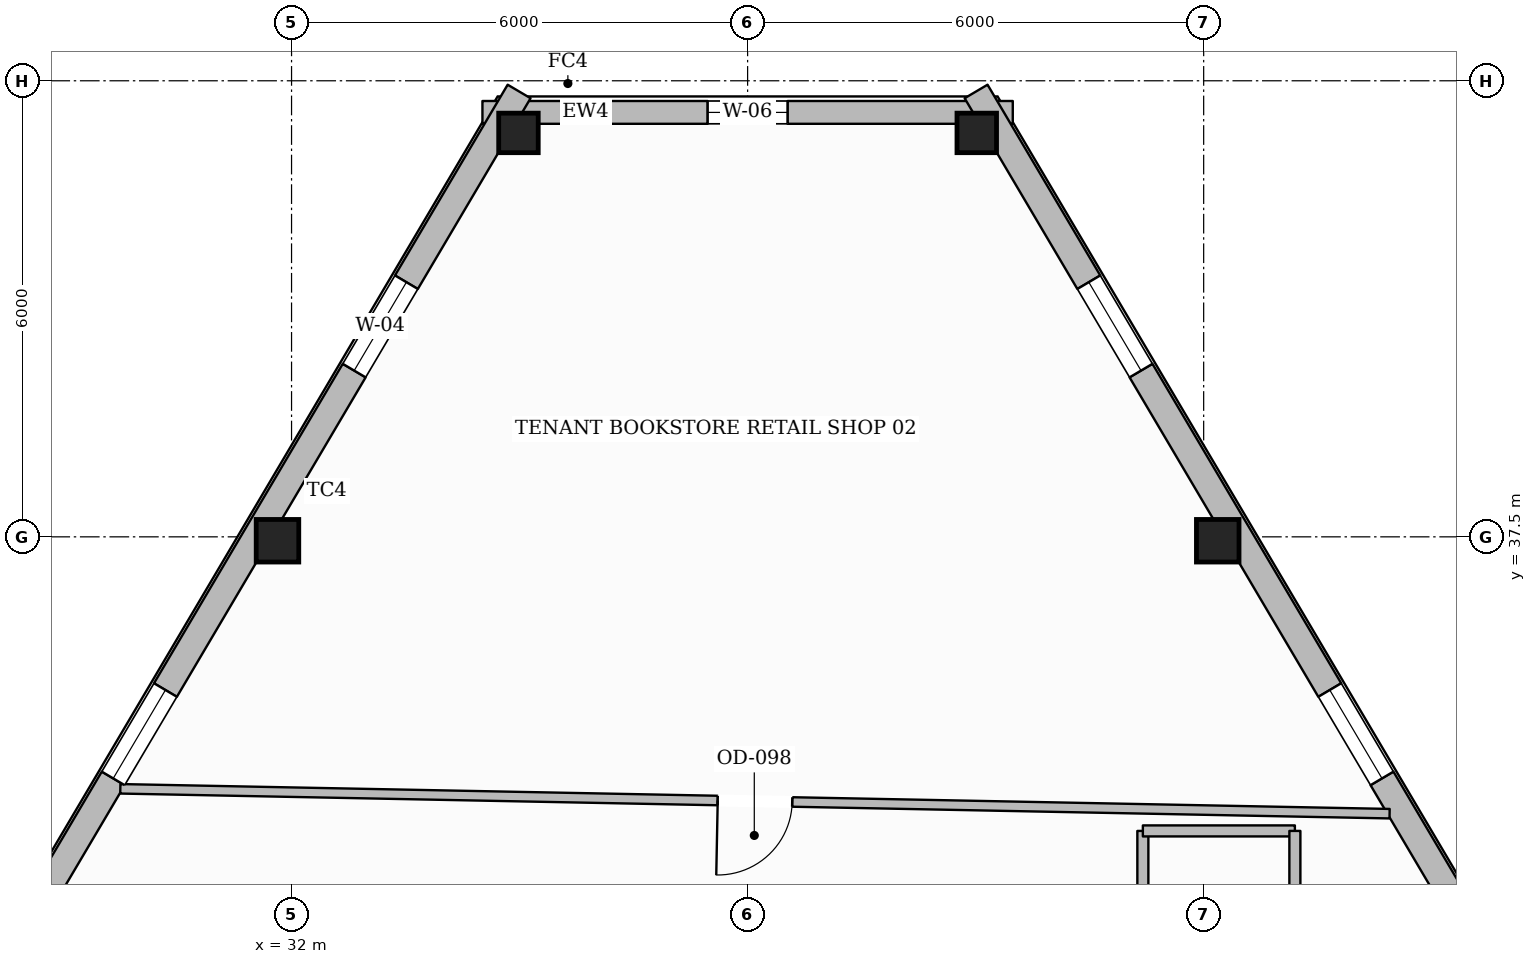
"""IFC4 building model, lengths in metres.
Left out: names, types, materials, properties, quantities, classifications, styles, units other than length and angle.
Written with IfcOpenShell. Run it as: python <this file> out.ifc"""

import sys

from ifc_helpers import new_model, si_unit, direction, frame, frame_2d, origin, origin_2d, place, context, subcontext, project, spatial, rectangle, hollow_rectangle, extrude, element, fill, save


model = new_model("IFC4")
c1 = context("Model", 3, precision=1e-05, world=origin(), true_north=direction((0.0, 1.0)))
c2 = subcontext(c1, "Body", "Model", "MODEL_VIEW")
j1 = project(units=[si_unit("LENGTHUNIT", "METRE"), si_unit("PLANEANGLEUNIT", "RADIAN")], contexts=[c1])
p1 = place(None, origin())
s1 = spatial("IfcSite", under=j1, at=p1, CompositionType="ELEMENT")
p2 = place(p1, origin())
s2 = spatial("IfcBuilding", under=s1, at=p2, CompositionType="ELEMENT")
p3 = place(p2, frame((0.0, 0.0, 274.15)))
s3 = spatial("IfcBuildingStorey", under=s2, at=p3, CompositionType="ELEMENT", Elevation=274.15)
p4 = place(p3, frame((34.985, 42.814, 0.0), z_axis=(0.0, 0.0, 1.0), x_axis=(1.0, 0.0, 0.0)))
e1 = element("IfcColumn", 1, at=p4, inside=s3, PredefinedType="COLUMN", context=c2, shape_type="SweptSolid", body=[
    extrude(hollow_rectangle(XDim=0.52, YDim=0.52, WallThickness=0.024, at=origin_2d()), origin(), (0.0, 0.0, 1.0), 3.61),
])
for number, where, z_axis, x_axis in (
    (2, (31.815, 37.448, 0.0), (0.0, 0.0, 1.0), (1.0, 0.0, 0.0)),
    (3, (44.185, 37.448, 0.0), (0.0, 0.0, 1.0), (1.0, 0.0, 0.0)),
):
    element("IfcColumn", number, at=place(p3, frame(where, z_axis=z_axis, x_axis=x_axis)), inside=s3, PredefinedType="COLUMN", context=c2, shape_type="SweptSolid", body=[
        extrude(hollow_rectangle(XDim=0.56, YDim=0.56, WallThickness=0.025, at=origin_2d()), origin(), (0.0, 0.0, 1.0), 3.61),
    ])
p5 = place(p3, frame((41.015, 42.814, 0.0), z_axis=(0.0, 0.0, 1.0), x_axis=(1.0, 0.0, 0.0)))
e4 = element("IfcColumn", 4, at=p5, inside=s3, PredefinedType="COLUMN", context=c2, shape_type="SweptSolid", body=[
    extrude(hollow_rectangle(XDim=0.52, YDim=0.52, WallThickness=0.024, at=origin_2d()), origin(), (0.0, 0.0, 1.0), 3.61),
])
p6 = place(p3, frame((34.511, 43.084, 0.0), z_axis=(0.0, 0.0, 1.0), x_axis=(1.0, 0.0, 0.0)))
e5 = element("IfcWall", 5, at=p6, inside=s3, PredefinedType="STANDARD", context=c2, shape_type="SweptSolid", body=[
    extrude(rectangle(XDim=6.977, YDim=0.3, at=frame_2d((3.489, 0.0))), origin(), (0.0, 0.0, 1.0), 3.196),
])
p7 = place(p6, frame((2.964, 0.0, 0.65)))
e6 = element("IfcOpeningElement", 6, at=p7, cuts=e5, PredefinedType="OPENING", context=c2, shape_type="SweptSolid", body=[
    extrude(rectangle(XDim=1.05, YDim=1.7, at=frame_2d((0.525, 0.85))), frame((0.0, 0.16, 0.0), z_axis=(0.0, -1.0, 0.0), x_axis=(1.0, 0.0, 0.0)), (0.0, 0.0, 1.0), 0.32),
])
p8 = place(p3, frame((15.485, 10.343, 0.0), z_axis=(0.0, 0.0, 1.0), x_axis=(0.508715156146, 0.860934892955, 0.0)))
e7 = element("IfcWall", 7, at=p8, inside=s3, PredefinedType="STANDARD", context=c2, shape_type="SweptSolid", body=[
    extrude(rectangle(XDim=38.349, YDim=0.35, at=frame_2d((19.175, 0.0))), origin(), (0.0, 0.0, 1.0), 3.196),
])
p9 = place(p8, frame((34.084, 0.0, 0.65)))
e8 = element("IfcOpeningElement", 8, at=p9, cuts=e7, PredefinedType="OPENING", context=c2, shape_type="SweptSolid", body=[
    extrude(rectangle(XDim=1.35, YDim=1.75, at=frame_2d((0.675, 0.875))), frame((0.0, 0.185, 0.0), z_axis=(0.0, -1.0, 0.0), x_axis=(1.0, 0.0, 0.0)), (0.0, 0.0, 1.0), 0.37),
])
p10 = place(p8, frame((27.852, 0.0, 0.65)))
e9 = element("IfcOpeningElement", 9, at=p10, cuts=e7, PredefinedType="OPENING", context=c2, shape_type="SweptSolid", body=[
    extrude(rectangle(XDim=1.35, YDim=1.75, at=frame_2d((0.675, 0.875))), frame((0.0, 0.185, 0.0), z_axis=(0.0, -1.0, 0.0), x_axis=(1.0, 0.0, 0.0)), (0.0, 0.0, 1.0), 0.37),
])
p11 = place(p8, frame((15.388, 0.0, 0.65)))
e10 = element("IfcOpeningElement", 10, at=p11, cuts=e7, PredefinedType="OPENING", context=c2, shape_type="SweptSolid", body=[
    extrude(rectangle(XDim=1.35, YDim=1.75, at=frame_2d((0.675, 0.875))), frame((0.0, 0.185, 0.0), z_axis=(0.0, -1.0, 0.0), x_axis=(1.0, 0.0, 0.0)), (0.0, 0.0, 1.0), 0.37),
])
p12 = place(p8, frame((9.156, 0.0, 0.65)))
e11 = element("IfcOpeningElement", 11, at=p12, cuts=e7, PredefinedType="OPENING", context=c2, shape_type="SweptSolid", body=[
    extrude(rectangle(XDim=1.35, YDim=1.75, at=frame_2d((0.675, 0.875))), frame((0.0, 0.185, 0.0), z_axis=(0.0, -1.0, 0.0), x_axis=(1.0, 0.0, 0.0)), (0.0, 0.0, 1.0), 0.37),
])
p13 = place(p8, frame((2.925, 0.0, 0.65)))
e12 = element("IfcOpeningElement", 12, at=p13, cuts=e7, PredefinedType="OPENING", context=c2, shape_type="SweptSolid", body=[
    extrude(rectangle(XDim=1.35, YDim=1.75, at=frame_2d((0.675, 0.875))), frame((0.0, 0.185, 0.0), z_axis=(0.0, -1.0, 0.0), x_axis=(1.0, 0.0, 0.0)), (0.0, 0.0, 1.0), 0.37),
])
p14 = place(p3, frame((41.006, 43.359, 0.0), z_axis=(0.0, 0.0, 1.0), x_axis=(0.508715156146, -0.860934892955, 0.0)))
e13 = element("IfcWall", 13, at=p14, inside=s3, PredefinedType="STANDARD", context=c2, shape_type="SweptSolid", body=[
    extrude(rectangle(XDim=38.349, YDim=0.35, at=frame_2d((19.175, 0.0))), origin(), (0.0, 0.0, 1.0), 3.196),
])
p15 = place(p14, frame((34.074, 0.0, 0.65)))
e14 = element("IfcOpeningElement", 14, at=p15, cuts=e13, PredefinedType="OPENING", context=c2, shape_type="SweptSolid", body=[
    extrude(rectangle(XDim=1.35, YDim=1.75, at=frame_2d((0.675, 0.875))), frame((0.0, 0.185, 0.0), z_axis=(0.0, -1.0, 0.0), x_axis=(1.0, 0.0, 0.0)), (0.0, 0.0, 1.0), 0.37),
])
p16 = place(p14, frame((27.843, 0.0, 0.65)))
e15 = element("IfcOpeningElement", 15, at=p16, cuts=e13, PredefinedType="OPENING", context=c2, shape_type="SweptSolid", body=[
    extrude(rectangle(XDim=1.35, YDim=1.75, at=frame_2d((0.675, 0.875))), frame((0.0, 0.185, 0.0), z_axis=(0.0, -1.0, 0.0), x_axis=(1.0, 0.0, 0.0)), (0.0, 0.0, 1.0), 0.37),
])
p17 = place(p14, frame((15.379, 0.0, 0.65)))
e16 = element("IfcOpeningElement", 16, at=p17, cuts=e13, PredefinedType="OPENING", context=c2, shape_type="SweptSolid", body=[
    extrude(rectangle(XDim=1.35, YDim=1.75, at=frame_2d((0.675, 0.875))), frame((0.0, 0.185, 0.0), z_axis=(0.0, -1.0, 0.0), x_axis=(1.0, 0.0, 0.0)), (0.0, 0.0, 1.0), 0.37),
])
p18 = place(p14, frame((9.147, 0.0, 0.65)))
e17 = element("IfcOpeningElement", 17, at=p18, cuts=e13, PredefinedType="OPENING", context=c2, shape_type="SweptSolid", body=[
    extrude(rectangle(XDim=1.35, YDim=1.75, at=frame_2d((0.675, 0.875))), frame((0.0, 0.185, 0.0), z_axis=(0.0, -1.0, 0.0), x_axis=(1.0, 0.0, 0.0)), (0.0, 0.0, 1.0), 0.37),
])
p19 = place(p14, frame((2.915, 0.0, 0.65)))
e18 = element("IfcOpeningElement", 18, at=p19, cuts=e13, PredefinedType="OPENING", context=c2, shape_type="SweptSolid", body=[
    extrude(rectangle(XDim=1.35, YDim=1.75, at=frame_2d((0.675, 0.875))), frame((0.0, 0.185, 0.0), z_axis=(0.0, -1.0, 0.0), x_axis=(1.0, 0.0, 0.0)), (0.0, 0.0, 1.0), 0.37),
])
p20 = place(p3, frame((43.2, 24.99, 0.0), z_axis=(0.0, 0.0, 1.0), x_axis=(0.0, 1.0, 0.0)))
e19 = element("IfcWall", 19, at=p20, inside=s3, PredefinedType="PARTITIONING", context=c2, shape_type="SweptSolid", body=[
    extrude(rectangle(XDim=8.641, YDim=0.145, at=frame_2d((4.321, 0.0))), origin(), (0.0, 0.0, 1.0), 3.61),
])
p21 = place(p20, frame((3.621, 0.0, 0.0)))
e20 = element("IfcOpeningElement", 20, at=p21, cuts=e19, PredefinedType="OPENING", context=c2, shape_type="SweptSolid", body=[
    extrude(rectangle(XDim=1.4, YDim=2.2, at=frame_2d((0.7, 1.1))), frame((0.0, 0.083, 0.0), z_axis=(0.0, -1.0, 0.0), x_axis=(1.0, 0.0, 0.0)), (0.0, 0.0, 1.0), 0.165),
])
p22 = place(p3, frame((43.2, 33.631, 0.0), z_axis=(0.0, 0.0, 1.0), x_axis=(1.0, 0.0, 0.0)))
e21 = element("IfcWall", 21, at=p22, inside=s3, PredefinedType="PARTITIONING", context=c2, shape_type="SweptSolid", body=[
    extrude(rectangle(XDim=2.0, YDim=0.145, at=frame_2d((1.0, 0.0))), origin(), (0.0, 0.0, 1.0), 3.61),
])
p23 = place(p3, frame((45.2, 33.631, 0.0), z_axis=(0.0, 0.0, 1.0), x_axis=(0.0, -1.0, 0.0)))
e22 = element("IfcWall", 22, at=p23, inside=s3, PredefinedType="PARTITIONING", context=c2, shape_type="SweptSolid", body=[
    extrude(rectangle(XDim=8.641, YDim=0.145, at=frame_2d((4.321, 0.0))), origin(), (0.0, 0.0, 1.0), 3.61),
])
p24 = place(p3, frame((46.446, 33.858, 0.0), z_axis=(0.0, 0.0, 1.0), x_axis=(-0.999807860979, 0.019602069382, 0.0)))
e23 = element("IfcWall", 23, at=p24, inside=s3, PredefinedType="PARTITIONING", context=c2, shape_type="SweptSolid", body=[
    extrude(rectangle(XDim=16.702, YDim=0.125, at=frame_2d((8.351, 0.0))), origin(), (0.0, 0.0, 1.0), 3.61),
])
p25 = place(p24, frame((7.861, 0.0, 0.0)))
e24 = element("IfcOpeningElement", 24, at=p25, cuts=e23, PredefinedType="OPENING", context=c2, shape_type="SweptSolid", body=[
    extrude(rectangle(XDim=0.98, YDim=2.15, at=frame_2d((0.49, 1.075))), frame((0.0, 0.073, 0.0), z_axis=(0.0, -1.0, 0.0), x_axis=(1.0, 0.0, 0.0)), (0.0, 0.0, 1.0), 0.145),
])
p26 = place(p9, origin())
e25 = element("IfcWindow", 25, at=p26, inside=s3, PartitioningType="SINGLE_PANEL", PredefinedType="WINDOW", context=c2, shape_type="SweptSolid", body=[
    extrude(rectangle(XDim=1.35, YDim=1.75, at=frame_2d((0.675, 0.875))), frame((0.0, 0.03, 0.0), z_axis=(0.0, -1.0, 0.0), x_axis=(1.0, 0.0, 0.0)), (0.0, 0.0, 1.0), 0.06),
])
fill(e8, e25)
p27 = place(p10, origin())
e26 = element("IfcWindow", 26, at=p27, inside=s3, PartitioningType="SINGLE_PANEL", PredefinedType="WINDOW", context=c2, shape_type="SweptSolid", body=[
    extrude(rectangle(XDim=1.35, YDim=1.75, at=frame_2d((0.675, 0.875))), frame((0.0, 0.03, 0.0), z_axis=(0.0, -1.0, 0.0), x_axis=(1.0, 0.0, 0.0)), (0.0, 0.0, 1.0), 0.06),
])
fill(e9, e26)
p28 = place(p18, origin())
e27 = element("IfcWindow", 27, at=p28, inside=s3, PartitioningType="SINGLE_PANEL", PredefinedType="WINDOW", context=c2, shape_type="SweptSolid", body=[
    extrude(rectangle(XDim=1.35, YDim=1.75, at=frame_2d((0.675, 0.875))), frame((0.0, 0.03, 0.0), z_axis=(0.0, -1.0, 0.0), x_axis=(1.0, 0.0, 0.0)), (0.0, 0.0, 1.0), 0.06),
])
fill(e17, e27)
p29 = place(p19, origin())
e28 = element("IfcWindow", 28, at=p29, inside=s3, PartitioningType="SINGLE_PANEL", PredefinedType="WINDOW", context=c2, shape_type="SweptSolid", body=[
    extrude(rectangle(XDim=1.35, YDim=1.75, at=frame_2d((0.675, 0.875))), frame((0.0, 0.03, 0.0), z_axis=(0.0, -1.0, 0.0), x_axis=(1.0, 0.0, 0.0)), (0.0, 0.0, 1.0), 0.06),
])
fill(e18, e28)
p30 = place(p7, origin())
e29 = element("IfcWindow", 29, at=p30, inside=s3, PartitioningType="SINGLE_PANEL", PredefinedType="WINDOW", context=c2, shape_type="SweptSolid", body=[
    extrude(rectangle(XDim=1.05, YDim=1.7, at=frame_2d((0.525, 0.85))), frame((0.0, 0.03, 0.0), z_axis=(0.0, -1.0, 0.0), x_axis=(1.0, 0.0, 0.0)), (0.0, 0.0, 1.0), 0.06),
])
fill(e6, e29)
p31 = place(p25, origin())
e30 = element("IfcDoor", 30, at=p31, inside=s3, OperationType="SINGLE_SWING_RIGHT", PredefinedType="DOOR", context=c2, shape_type="SweptSolid", body=[
    extrude(rectangle(XDim=0.98, YDim=2.15, at=frame_2d((0.49, 1.075))), frame((0.0, 0.025, 0.0), z_axis=(0.0, -1.0, 0.0), x_axis=(1.0, 0.0, 0.0)), (0.0, 0.0, 1.0), 0.05),
])
fill(e24, e30)
save(model, sys.argv[1])
